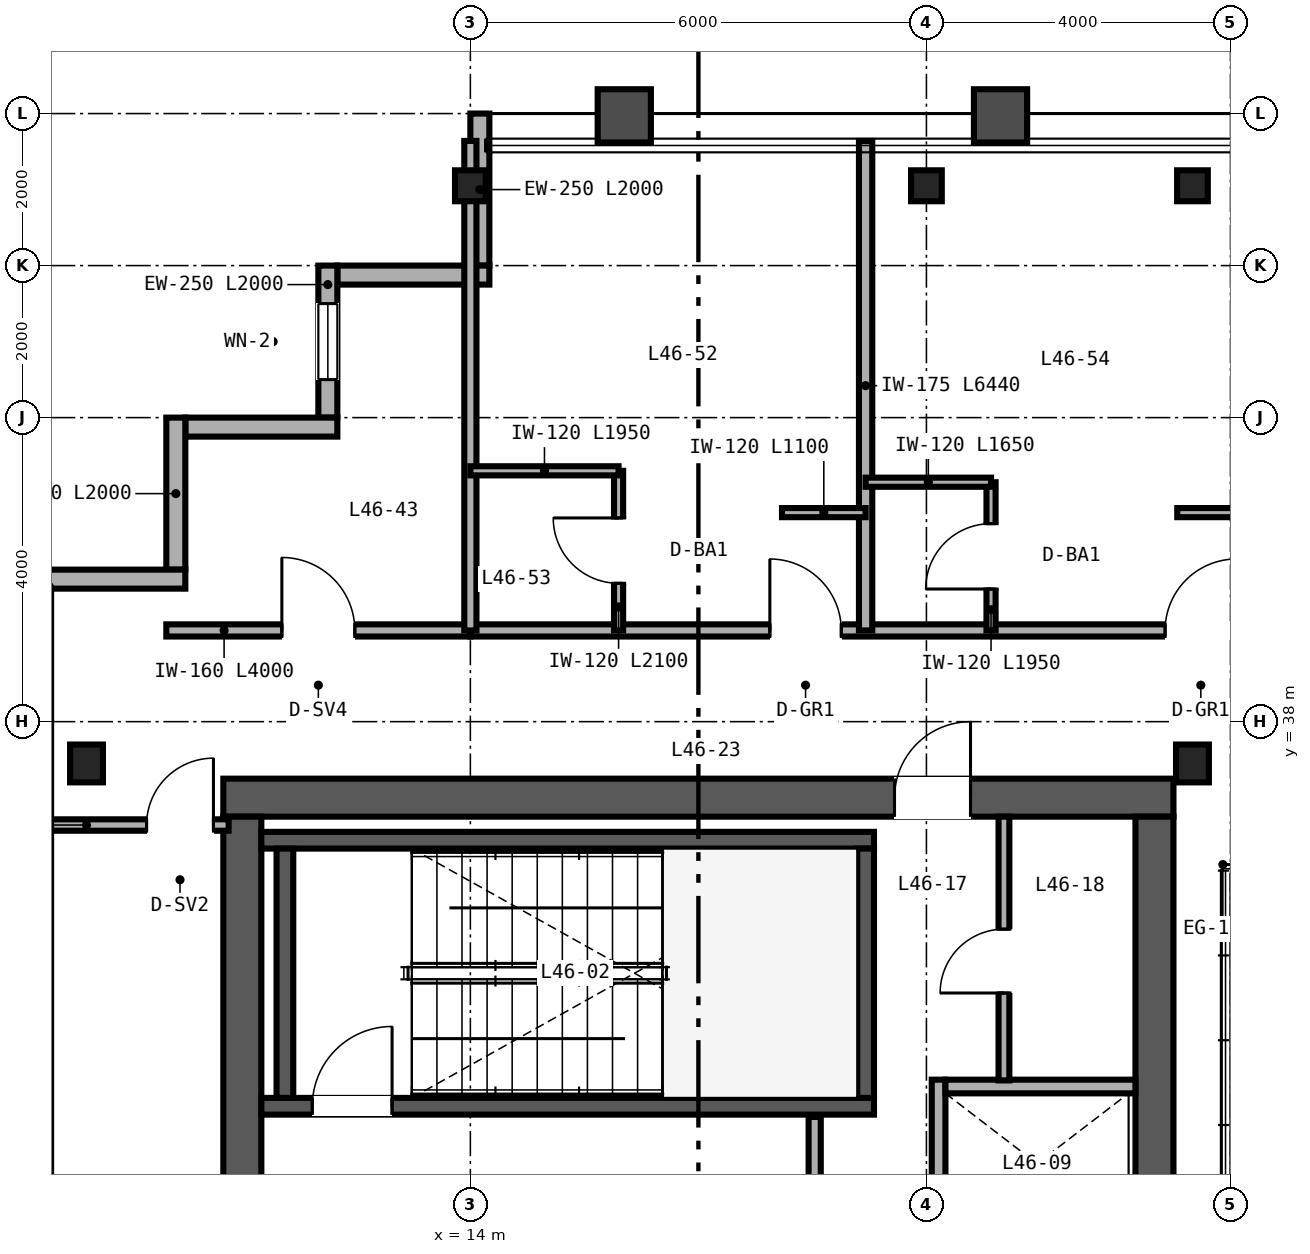
"""IFC4 building model, lengths in metres.
Left out: names, types, materials, properties, quantities, classifications, styles, units other than length and angle.
Written with IfcOpenShell. Run it as: python <this file> out.ifc"""

import sys

from ifc_helpers import new_model, si_unit, direction, frame, frame_2d, origin, origin_2d, place, context, subcontext, project, spatial, rectangle, i_section, extrude, source, transform, mapped, element, fill, save


model = new_model("IFC4")
c1 = context("Model", 3, precision=1e-05, world=origin(), true_north=direction((0.0, 1.0)))
c2 = subcontext(c1, "Body", "Model", "MODEL_VIEW")
j1 = project(units=[si_unit("LENGTHUNIT", "METRE"), si_unit("PLANEANGLEUNIT", "RADIAN")], contexts=[c1])
p1 = place(None, origin())
s1 = spatial("IfcSite", under=j1, at=p1, CompositionType="ELEMENT")
p2 = place(p1, origin())
s2 = spatial("IfcBuilding", under=s1, at=p2, CompositionType="ELEMENT")
p3 = place(p2, frame((0.0, 0.0, 184.8)))
s3 = spatial("IfcBuildingStorey", under=s2, at=p3, CompositionType="ELEMENT", Elevation=184.8)
p4 = place(p3, frame((10.75, 37.0, 0.0), z_axis=(0.0, 0.0, 1.0), x_axis=(1.0, 0.0, 0.0)))
e1 = element("IfcWall", 1, at=p4, inside=s3, PredefinedType="SHEAR", context=c2, shape_type="SweptSolid", body=[
    extrude(rectangle(XDim=12.5, YDim=0.5, at=frame_2d((6.25, 0.0))), origin(), (0.0, 0.0, 1.0), 3.37),
])
p5 = place(p4, frame((8.83, 0.0, 0.0)))
e2 = element("IfcOpeningElement", 2, at=p5, cuts=e1, PredefinedType="OPENING", context=c2, shape_type="SweptSolid", body=[
    extrude(rectangle(XDim=1.0, YDim=2.15, at=frame_2d((0.5, 1.075))), frame((0.0, 0.26, 0.0), z_axis=(0.0, -1.0, 0.0), x_axis=(1.0, 0.0, 0.0)), (0.0, 0.0, 1.0), 0.52),
])
for number, where, z_axis, x_axis in (
    (3, (11.0, 15.25, 0.0), (0.0, 0.0, 1.0), (0.0, 1.0, 0.0)),
    (4, (23.0, 15.25, 0.0), (0.0, 0.0, 1.0), (0.0, 1.0, 0.0)),
):
    element("IfcWall", number, at=place(p3, frame(where, z_axis=z_axis, x_axis=x_axis)), inside=s3, PredefinedType="SHEAR", context=c2, shape_type="SweptSolid", body=[
        extrude(rectangle(XDim=21.5, YDim=0.5, at=frame_2d((10.75, 0.0))), origin(), (0.0, 0.0, 1.0), 3.37),
    ])
p6 = place(p3, frame((11.25, 32.94, 0.0), z_axis=(0.0, 0.0, 1.0), x_axis=(1.0, 0.0, 0.0)))
e5 = element("IfcWall", 5, at=p6, inside=s3, PredefinedType="SHEAR", context=c2, shape_type="SweptSolid", body=[
    extrude(rectangle(XDim=8.06, YDim=0.22, at=frame_2d((4.03, 0.0))), origin(), (0.0, 0.0, 1.0), 3.4),
])
p7 = place(p6, frame((0.67, 0.0, 0.0)))
e6 = element("IfcOpeningElement", 6, at=p7, cuts=e5, PredefinedType="OPENING", context=c2, shape_type="SweptSolid", body=[
    extrude(rectangle(XDim=1.05, YDim=2.15, at=frame_2d((0.525, 1.075))), frame((0.0, 0.12, 0.0), z_axis=(0.0, -1.0, 0.0), x_axis=(1.0, 0.0, 0.0)), (0.0, 0.0, 1.0), 0.24),
])
p8 = place(p3, frame((11.25, 36.44, 0.0), z_axis=(0.0, 0.0, 1.0), x_axis=(1.0, 0.0, 0.0)))
e7 = element("IfcWall", 7, at=p8, inside=s3, PredefinedType="SHEAR", context=c2, shape_type="SweptSolid", body=[
    extrude(rectangle(XDim=8.06, YDim=0.22, at=frame_2d((4.03, 0.0))), origin(), (0.0, 0.0, 1.0), 3.4),
])
for number, where, z_axis, x_axis in (
    (8, (11.56, 33.05, 0.0), (0.0, 0.0, 1.0), (0.0, 1.0, 0.0)),
    (9, (19.2, 33.05, 0.0), (0.0, 0.0, 1.0), (0.0, 1.0, 0.0)),
):
    element("IfcWall", number, at=place(p3, frame(where, z_axis=z_axis, x_axis=x_axis)), inside=s3, PredefinedType="SHEAR", context=c2, shape_type="SweptSolid", body=[
        extrude(rectangle(XDim=3.28, YDim=0.22, at=frame_2d((1.64, 0.0))), origin(), (0.0, 0.0, 1.0), 3.4),
    ])
m1 = source(origin(), c2, "Body", "SweptSolid", [
    extrude(i_section(OverallWidth=0.432, OverallDepth=0.498, WebThickness=0.056, FlangeThickness=0.089, FilletRadius=0.025, at=origin_2d()), origin(), (0.0, 0.0, 1.0), 3.37),
])
for number, where, z_axis, x_axis in (
    (10, (8.95, 37.45, 0.0), (0.0, 0.0, 1.0), (1.0, 0.0, 0.0)),
    (11, (23.5, 37.45, 0.0), (0.0, 0.0, 1.0), (1.0, 0.0, 0.0)),
):
    element("IfcColumn", number, at=place(p3, frame(where, z_axis=z_axis, x_axis=x_axis)), inside=s3, PredefinedType="COLUMN", context=c2, shape_type="MappedRepresentation", body=[
        mapped(m1, transform((0.0, 0.0, 0.0), scale=1.0)),
    ])
m2 = source(origin(), c2, "Body", "SweptSolid", [
    extrude(i_section(OverallWidth=0.404, OverallDepth=0.407, WebThickness=0.027, FlangeThickness=0.044, FilletRadius=0.025, at=origin_2d()), origin(), (0.0, 0.0, 1.0), 3.37),
])
for number, where, z_axis, x_axis in (
    (12, (14.0, 45.05, 0.0), (0.0, 0.0, 1.0), (1.0, 0.0, 0.0)),
    (13, (20.0, 45.05, 0.0), (0.0, 0.0, 1.0), (1.0, 0.0, 0.0)),
    (14, (23.5, 45.05, 0.0), (0.0, 0.0, 1.0), (1.0, 0.0, 0.0)),
):
    element("IfcColumn", number, at=place(p3, frame(where, z_axis=z_axis, x_axis=x_axis)), inside=s3, PredefinedType="COLUMN", context=c2, shape_type="MappedRepresentation", body=[
        mapped(m2, transform((0.0, 0.0, 0.0), scale=1.0)),
    ])
p9 = place(p3, frame((14.125, 46.0, 0.0), z_axis=(0.0, 0.0, 1.0), x_axis=(0.0, -1.0, 0.0)))
e15 = element("IfcWall", 15, at=p9, inside=s3, PredefinedType="SOLIDWALL", context=c2, shape_type="SweptSolid", body=[
    extrude(rectangle(XDim=2.0, YDim=0.25, at=frame_2d((1.0, 0.0))), origin(), (0.0, 0.0, 1.0), 2.677),
])
p10 = place(p3, frame((14.25, 43.875, 0.0), z_axis=(0.0, 0.0, 1.0), x_axis=(-1.0, 0.0, 0.0)))
e16 = element("IfcWall", 16, at=p10, inside=s3, PredefinedType="SOLIDWALL", context=c2, shape_type="SweptSolid", body=[
    extrude(rectangle(XDim=2.0, YDim=0.25, at=frame_2d((1.0, 0.0))), origin(), (0.0, 0.0, 1.0), 3.37),
])
p11 = place(p3, frame((12.125, 44.0, 0.0), z_axis=(0.0, 0.0, 1.0), x_axis=(0.0, -1.0, 0.0)))
e17 = element("IfcWall", 17, at=p11, inside=s3, PredefinedType="SOLIDWALL", context=c2, shape_type="SweptSolid", body=[
    extrude(rectangle(XDim=2.0, YDim=0.25, at=frame_2d((1.0, 0.0))), origin(), (0.0, 0.0, 1.0), 3.37),
])
p12 = place(p11, frame((0.5, 0.0, 0.85)))
e18 = element("IfcOpeningElement", 18, at=p12, cuts=e17, PredefinedType="OPENING", context=c2, shape_type="SweptSolid", body=[
    extrude(rectangle(XDim=1.0, YDim=1.9, at=frame_2d((0.5, 0.95))), frame((0.0, 0.135, 0.0), z_axis=(0.0, -1.0, 0.0), x_axis=(1.0, 0.0, 0.0)), (0.0, 0.0, 1.0), 0.27),
])
for number, where, z_axis, x_axis in (
    (19, (12.25, 41.875, 0.0), (0.0, 0.0, 1.0), (-1.0, 0.0, 0.0)),
    (20, (10.125, 42.0, 0.0), (0.0, 0.0, 1.0), (0.0, -1.0, 0.0)),
):
    element("IfcWall", number, at=place(p3, frame(where, z_axis=z_axis, x_axis=x_axis)), inside=s3, PredefinedType="SOLIDWALL", context=c2, shape_type="SweptSolid", body=[
        extrude(rectangle(XDim=2.0, YDim=0.25, at=frame_2d((1.0, 0.0))), origin(), (0.0, 0.0, 1.0), 3.37),
    ])
p13 = place(p3, frame((10.25, 39.875, 0.0), z_axis=(0.0, 0.0, 1.0), x_axis=(-1.0, 0.0, 0.0)))
e21 = element("IfcWall", 21, at=p13, inside=s3, PredefinedType="SOLIDWALL", context=c2, shape_type="SweptSolid", body=[
    extrude(rectangle(XDim=2.25, YDim=0.25, at=frame_2d((1.125, 0.0))), origin(), (0.0, 0.0, 1.0), 3.37),
])
p14 = place(p3, frame((20.16, 29.0, 0.0), z_axis=(0.0, 0.0, 1.0), x_axis=(0.0, 1.0, 0.0)))
e22 = element("IfcWall", 22, at=p14, inside=s3, PredefinedType="SOLIDWALL", context=c2, shape_type="SweptSolid", body=[
    extrude(rectangle(XDim=4.29, YDim=0.18, at=frame_2d((2.145, 0.0))), origin(), (0.0, 0.0, 1.0), 3.37),
])
p15 = place(p3, frame((20.25, 33.2, 0.0), z_axis=(0.0, 0.0, 1.0), x_axis=(1.0, 0.0, 0.0)))
e23 = element("IfcWall", 23, at=p15, inside=s3, PredefinedType="SOLIDWALL", context=c2, shape_type="SweptSolid", body=[
    extrude(rectangle(XDim=2.5, YDim=0.18, at=frame_2d((1.25, 0.0))), origin(), (0.0, 0.0, 1.0), 3.37),
])
p16 = place(p3, frame((18.53, 28.9, 0.0), z_axis=(0.0, 0.0, 1.0), x_axis=(0.0, 1.0, 0.0)))
e24 = element("IfcWall", 24, at=p16, inside=s3, PredefinedType="PARTITIONING", context=c2, shape_type="SweptSolid", body=[
    extrude(rectangle(XDim=3.9, YDim=0.16, at=frame_2d((1.95, 0.0))), origin(), (0.0, 0.0, 1.0), 3.37),
])
p17 = place(p16, frame((1.5, 0.0, 0.0)))
e25 = element("IfcOpeningElement", 25, at=p17, cuts=e24, PredefinedType="OPENING", context=c2, shape_type="SweptSolid", body=[
    extrude(rectangle(XDim=1.0, YDim=2.15, at=frame_2d((0.5, 1.075))), frame((0.0, 0.09, 0.0), z_axis=(0.0, -1.0, 0.0), x_axis=(1.0, 0.0, 0.0)), (0.0, 0.0, 1.0), 0.18),
])
p18 = place(p3, frame((21.02, 33.28, 0.0), z_axis=(0.0, 0.0, 1.0), x_axis=(0.0, 1.0, 0.0)))
e26 = element("IfcWall", 26, at=p18, inside=s3, PredefinedType="PARTITIONING", context=c2, shape_type="SweptSolid", body=[
    extrude(rectangle(XDim=3.47, YDim=0.142, at=frame_2d((1.735, 0.0))), origin(), (0.0, 0.0, 1.0), 3.37),
])
p19 = place(p18, frame((1.15, 0.0, 0.0)))
e27 = element("IfcOpeningElement", 27, at=p19, cuts=e26, PredefinedType="OPENING", context=c2, shape_type="SweptSolid", body=[
    extrude(rectangle(XDim=0.84, YDim=2.1, at=frame_2d((0.42, 1.05))), frame((0.0, 0.081, 0.0), z_axis=(0.0, -1.0, 0.0), x_axis=(1.0, 0.0, 0.0)), (0.0, 0.0, 1.0), 0.162),
])
p20 = place(p3, frame((8.16, 36.64, 0.0), z_axis=(0.0, 0.0, 1.0), x_axis=(1.0, 0.0, 0.0)))
e28 = element("IfcWall", 28, at=p20, inside=s3, PredefinedType="PARTITIONING", context=c2, shape_type="SweptSolid", body=[
    extrude(rectangle(XDim=2.66, YDim=0.15, at=frame_2d((1.33, 0.0))), origin(), (0.0, 0.0, 1.0), 2.753),
])
p21 = place(p20, frame((1.58, 0.0, 0.0)))
e29 = element("IfcOpeningElement", 29, at=p21, cuts=e28, PredefinedType="OPENING", context=c2, shape_type="SweptSolid", body=[
    extrude(rectangle(XDim=0.88, YDim=2.15, at=frame_2d((0.44, 1.075))), frame((0.0, 0.085, 0.0), z_axis=(0.0, -1.0, 0.0), x_axis=(1.0, 0.0, 0.0)), (0.0, 0.0, 1.0), 0.17),
])
p22 = place(p3, frame((10.0, 39.2, 0.0), z_axis=(0.0, 0.0, 1.0), x_axis=(1.0, 0.0, 0.0)))
e30 = element("IfcWall", 30, at=p22, inside=s3, PredefinedType="PARTITIONING", context=c2, shape_type="SweptSolid", body=[
    extrude(rectangle(XDim=4.0, YDim=0.16, at=frame_2d((2.0, 0.0))), origin(), (0.0, 0.0, 1.0), 3.37),
])
p23 = place(p22, frame((1.52, 0.0, 0.0)))
e31 = element("IfcOpeningElement", 31, at=p23, cuts=e30, PredefinedType="OPENING", context=c2, shape_type="SweptSolid", body=[
    extrude(rectangle(XDim=0.96, YDim=2.15, at=frame_2d((0.48, 1.075))), frame((0.0, 0.09, 0.0), z_axis=(0.0, -1.0, 0.0), x_axis=(1.0, 0.0, 0.0)), (0.0, 0.0, 1.0), 0.18),
])
p24 = place(p3, frame((14.0, 39.2, 0.0), z_axis=(0.0, 0.0, 1.0), x_axis=(1.0, 0.0, 0.0)))
e32 = element("IfcWall", 32, at=p24, inside=s3, PredefinedType="PARTITIONING", context=c2, shape_type="SweptSolid", body=[
    extrude(rectangle(XDim=36.0, YDim=0.16, at=frame_2d((18.0, 0.0))), origin(), (0.0, 0.0, 1.0), 2.913),
])
p25 = place(p24, frame((3.94, 0.0, 0.0)))
e33 = element("IfcOpeningElement", 33, at=p25, cuts=e32, PredefinedType="OPENING", context=c2, shape_type="SweptSolid", body=[
    extrude(rectangle(XDim=0.94, YDim=2.15, at=frame_2d((0.47, 1.075))), frame((0.0, 0.09, 0.0), z_axis=(0.0, -1.0, 0.0), x_axis=(1.0, 0.0, 0.0)), (0.0, 0.0, 1.0), 0.18),
])
p26 = place(p24, frame((9.14, 0.0, 0.0)))
e34 = element("IfcOpeningElement", 34, at=p26, cuts=e32, PredefinedType="OPENING", context=c2, shape_type="SweptSolid", body=[
    extrude(rectangle(XDim=0.94, YDim=2.15, at=frame_2d((0.47, 1.075))), frame((0.0, 0.09, 0.0), z_axis=(0.0, -1.0, 0.0), x_axis=(1.0, 0.0, 0.0)), (0.0, 0.0, 1.0), 0.18),
])
p27 = place(p24, frame((12.72, 0.0, 0.0)))
e35 = element("IfcOpeningElement", 35, at=p27, cuts=e32, PredefinedType="OPENING", context=c2, shape_type="SweptSolid", body=[
    extrude(rectangle(XDim=0.96, YDim=2.15, at=frame_2d((0.48, 1.075))), frame((0.0, 0.09, 0.0), z_axis=(0.0, -1.0, 0.0), x_axis=(1.0, 0.0, 0.0)), (0.0, 0.0, 1.0), 0.18),
])
p28 = place(p24, frame((18.42, 0.0, 0.0)))
e36 = element("IfcOpeningElement", 36, at=p28, cuts=e32, PredefinedType="OPENING", context=c2, shape_type="SweptSolid", body=[
    extrude(rectangle(XDim=0.96, YDim=2.15, at=frame_2d((0.48, 1.075))), frame((0.0, 0.09, 0.0), z_axis=(0.0, -1.0, 0.0), x_axis=(1.0, 0.0, 0.0)), (0.0, 0.0, 1.0), 0.18),
])
p29 = place(p24, frame((26.34, 0.0, 0.0)))
e37 = element("IfcOpeningElement", 37, at=p29, cuts=e32, PredefinedType="OPENING", context=c2, shape_type="SweptSolid", body=[
    extrude(rectangle(XDim=0.94, YDim=2.15, at=frame_2d((0.47, 1.075))), frame((0.0, 0.09, 0.0), z_axis=(0.0, -1.0, 0.0), x_axis=(1.0, 0.0, 0.0)), (0.0, 0.0, 1.0), 0.18),
])
p30 = place(p24, frame((30.54, 0.0, 0.0)))
e38 = element("IfcOpeningElement", 38, at=p30, cuts=e32, PredefinedType="OPENING", context=c2, shape_type="SweptSolid", body=[
    extrude(rectangle(XDim=0.94, YDim=2.15, at=frame_2d((0.47, 1.075))), frame((0.0, 0.09, 0.0), z_axis=(0.0, -1.0, 0.0), x_axis=(1.0, 0.0, 0.0)), (0.0, 0.0, 1.0), 0.18),
])
p31 = place(p24, frame((34.74, 0.0, 0.0)))
e39 = element("IfcOpeningElement", 39, at=p31, cuts=e32, PredefinedType="OPENING", context=c2, shape_type="SweptSolid", body=[
    extrude(rectangle(XDim=0.94, YDim=2.15, at=frame_2d((0.47, 1.075))), frame((0.0, 0.09, 0.0), z_axis=(0.0, -1.0, 0.0), x_axis=(1.0, 0.0, 0.0)), (0.0, 0.0, 1.0), 0.18),
])
p32 = place(p3, frame((14.0, 39.2, 0.0), z_axis=(0.0, 0.0, 1.0), x_axis=(0.0, 1.0, 0.0)))
e40 = element("IfcWall", 40, at=p32, inside=s3, PredefinedType="PARTITIONING", context=c2, shape_type="SweptSolid", body=[
    extrude(rectangle(XDim=6.44, YDim=0.16, at=frame_2d((3.22, 0.0))), origin(), (0.0, 0.0, 1.0), 2.677),
])
p33 = place(p3, frame((19.2, 39.2, 0.0), z_axis=(0.0, 0.0, 1.0), x_axis=(0.0, 1.0, 0.0)))
e41 = element("IfcWall", 41, at=p33, inside=s3, PredefinedType="PARTITIONING", context=c2, shape_type="SweptSolid", body=[
    extrude(rectangle(XDim=6.44, YDim=0.175, at=frame_2d((3.22, 0.0))), origin(), (0.0, 0.0, 1.0), 2.677),
])
p34 = place(p3, frame((15.95, 39.2, 0.0), z_axis=(0.0, 0.0, 1.0), x_axis=(0.0, 1.0, 0.0)))
e42 = element("IfcWall", 42, at=p34, inside=s3, PredefinedType="PARTITIONING", context=c2, shape_type="SweptSolid", body=[
    extrude(rectangle(XDim=2.1, YDim=0.12, at=frame_2d((1.05, 0.0))), origin(), (0.0, 0.0, 1.0), 3.37),
])
p35 = place(p34, frame((0.62, 0.0, 0.0)))
e43 = element("IfcOpeningElement", 43, at=p35, cuts=e42, PredefinedType="OPENING", context=c2, shape_type="SweptSolid", body=[
    extrude(rectangle(XDim=0.86, YDim=2.1, at=frame_2d((0.43, 1.05))), frame((0.0, 0.07, 0.0), z_axis=(0.0, -1.0, 0.0), x_axis=(1.0, 0.0, 0.0)), (0.0, 0.0, 1.0), 0.14),
])
p36 = place(p3, frame((14.0, 41.3, 0.0), z_axis=(0.0, 0.0, 1.0), x_axis=(1.0, 0.0, 0.0)))
e44 = element("IfcWall", 44, at=p36, inside=s3, PredefinedType="PARTITIONING", context=c2, shape_type="SweptSolid", body=[
    extrude(rectangle(XDim=1.95, YDim=0.12, at=frame_2d((0.975, 0.0))), origin(), (0.0, 0.0, 1.0), 3.37),
])
p37 = place(p3, frame((18.1, 40.75, 0.0), z_axis=(0.0, 0.0, 1.0), x_axis=(1.0, 0.0, 0.0)))
e45 = element("IfcWall", 45, at=p37, inside=s3, PredefinedType="PARTITIONING", context=c2, shape_type="SweptSolid", body=[
    extrude(rectangle(XDim=1.1, YDim=0.12, at=frame_2d((0.55, 0.0))), origin(), (0.0, 0.0, 1.0), 3.37),
])
p38 = place(p3, frame((20.85, 39.2, 0.0), z_axis=(0.0, 0.0, 1.0), x_axis=(0.0, 1.0, 0.0)))
e46 = element("IfcWall", 46, at=p38, inside=s3, PredefinedType="PARTITIONING", context=c2, shape_type="SweptSolid", body=[
    extrude(rectangle(XDim=1.95, YDim=0.12, at=frame_2d((0.975, 0.0))), origin(), (0.0, 0.0, 1.0), 3.37),
])
p39 = place(p38, frame((0.545, 0.0, 0.0)))
e47 = element("IfcOpeningElement", 47, at=p39, cuts=e46, PredefinedType="OPENING", context=c2, shape_type="SweptSolid", body=[
    extrude(rectangle(XDim=0.86, YDim=2.1, at=frame_2d((0.43, 1.05))), frame((0.0, 0.07, 0.0), z_axis=(0.0, -1.0, 0.0), x_axis=(1.0, 0.0, 0.0)), (0.0, 0.0, 1.0), 0.14),
])
p40 = place(p3, frame((19.2, 41.15, 0.0), z_axis=(0.0, 0.0, 1.0), x_axis=(1.0, 0.0, 0.0)))
e48 = element("IfcWall", 48, at=p40, inside=s3, PredefinedType="PARTITIONING", context=c2, shape_type="SweptSolid", body=[
    extrude(rectangle(XDim=1.65, YDim=0.12, at=frame_2d((0.825, 0.0))), origin(), (0.0, 0.0, 1.0), 3.37),
])
p41 = place(p3, frame((23.3, 40.75, 0.0), z_axis=(0.0, 0.0, 1.0), x_axis=(1.0, 0.0, 0.0)))
e49 = element("IfcWall", 49, at=p41, inside=s3, PredefinedType="PARTITIONING", context=c2, shape_type="SweptSolid", body=[
    extrude(rectangle(XDim=1.1, YDim=0.12, at=frame_2d((0.55, 0.0))), origin(), (0.0, 0.0, 1.0), 2.913),
])
m3 = source(origin(), c2, "Body", "SweptSolid", [
    extrude(rectangle(XDim=1.0, YDim=1.9, at=frame_2d((0.5, 0.95))), frame((0.0, 0.03, 0.0), z_axis=(0.0, -1.0, 0.0), x_axis=(1.0, 0.0, 0.0)), (0.0, 0.0, 1.0), 0.06),
])
p42 = place(p12, origin())
e50 = element("IfcWindow", 50, at=p42, inside=s3, PartitioningType="SINGLE_PANEL", PredefinedType="WINDOW", context=c2, shape_type="MappedRepresentation", body=[
    mapped(m3, transform((0.0, 0.0, 0.0), scale=1.0)),
])
fill(e18, e50)
m4 = source(origin(), c2, "Body", "SweptSolid", [
    extrude(rectangle(XDim=1.05, YDim=2.15, at=frame_2d((0.525, 1.075))), frame((0.0, 0.025, 0.0), z_axis=(0.0, -1.0, 0.0), x_axis=(1.0, 0.0, 0.0)), (0.0, 0.0, 1.0), 0.05),
])
p43 = place(p7, origin())
e51 = element("IfcDoor", 51, at=p43, inside=s3, OperationType="SINGLE_SWING_RIGHT", PredefinedType="DOOR", context=c2, shape_type="MappedRepresentation", body=[
    mapped(m4, transform((0.0, 0.0, 0.0), scale=1.0)),
])
fill(e6, e51)
m5 = source(origin(), c2, "Body", "SweptSolid", [
    extrude(rectangle(XDim=0.84, YDim=2.1, at=frame_2d((0.42, 1.05))), frame((0.0, 0.025, 0.0), z_axis=(0.0, -1.0, 0.0), x_axis=(1.0, 0.0, 0.0)), (0.0, 0.0, 1.0), 0.05),
])
p44 = place(p19, origin())
e52 = element("IfcDoor", 52, at=p44, inside=s3, OperationType="SINGLE_SWING_LEFT", PredefinedType="DOOR", context=c2, shape_type="MappedRepresentation", body=[
    mapped(m5, transform((0.0, 0.0, 0.0), scale=1.0)),
])
fill(e27, e52)
m6 = source(origin(), c2, "Body", "SweptSolid", [
    extrude(rectangle(XDim=1.0, YDim=2.15, at=frame_2d((0.5, 1.075))), frame((0.0, 0.025, 0.0), z_axis=(0.0, -1.0, 0.0), x_axis=(1.0, 0.0, 0.0)), (0.0, 0.0, 1.0), 0.05),
])
p45 = place(p5, origin())
e53 = element("IfcDoor", 53, at=p45, inside=s3, OperationType="SINGLE_SWING_RIGHT", PredefinedType="DOOR", context=c2, shape_type="MappedRepresentation", body=[
    mapped(m6, transform((0.0, 0.0, 0.0), scale=1.0)),
])
fill(e2, e53)
m7 = source(origin(), c2, "Body", "SweptSolid", [
    extrude(rectangle(XDim=0.88, YDim=2.15, at=frame_2d((0.44, 1.075))), frame((0.0, 0.025, 0.0), z_axis=(0.0, -1.0, 0.0), x_axis=(1.0, 0.0, 0.0)), (0.0, 0.0, 1.0), 0.05),
])
p46 = place(p21, origin())
e54 = element("IfcDoor", 54, at=p46, inside=s3, OperationType="SINGLE_SWING_RIGHT", PredefinedType="DOOR", context=c2, shape_type="MappedRepresentation", body=[
    mapped(m7, transform((0.0, 0.0, 0.0), scale=1.0)),
])
fill(e29, e54)
m8 = source(origin(), c2, "Body", "SweptSolid", [
    extrude(rectangle(XDim=0.96, YDim=2.15, at=frame_2d((0.48, 1.075))), frame((0.0, 0.025, 0.0), z_axis=(0.0, -1.0, 0.0), x_axis=(1.0, 0.0, 0.0)), (0.0, 0.0, 1.0), 0.05),
])
p47 = place(p23, origin())
e55 = element("IfcDoor", 55, at=p47, inside=s3, OperationType="SINGLE_SWING_LEFT", PredefinedType="DOOR", context=c2, shape_type="MappedRepresentation", body=[
    mapped(m8, transform((0.0, 0.0, 0.0), scale=1.0)),
])
fill(e31, e55)
m9 = source(origin(), c2, "Body", "SweptSolid", [
    extrude(rectangle(XDim=0.86, YDim=2.1, at=frame_2d((0.43, 1.05))), frame((0.0, 0.025, 0.0), z_axis=(0.0, -1.0, 0.0), x_axis=(1.0, 0.0, 0.0)), (0.0, 0.0, 1.0), 0.05),
])
p48 = place(p35, origin())
e56 = element("IfcDoor", 56, at=p48, inside=s3, OperationType="SINGLE_SWING_RIGHT", PredefinedType="DOOR", context=c2, shape_type="MappedRepresentation", body=[
    mapped(m9, transform((0.0, 0.0, 0.0), scale=1.0)),
])
fill(e43, e56)
p49 = place(p39, origin())
e57 = element("IfcDoor", 57, at=p49, inside=s3, OperationType="SINGLE_SWING_LEFT", PredefinedType="DOOR", context=c2, shape_type="MappedRepresentation", body=[
    mapped(m9, transform((0.0, 0.0, 0.0), scale=1.0)),
])
fill(e47, e57)
m10 = source(origin(), c2, "Body", "SweptSolid", [
    extrude(rectangle(XDim=0.94, YDim=2.15, at=frame_2d((0.47, 1.075))), frame((0.0, 0.025, 0.0), z_axis=(0.0, -1.0, 0.0), x_axis=(1.0, 0.0, 0.0)), (0.0, 0.0, 1.0), 0.05),
])
p50 = place(p25, origin())
e58 = element("IfcDoor", 58, at=p50, inside=s3, OperationType="SINGLE_SWING_LEFT", PredefinedType="DOOR", context=c2, shape_type="MappedRepresentation", body=[
    mapped(m10, transform((0.0, 0.0, 0.0), scale=1.0)),
])
fill(e33, e58)
p51 = place(p26, origin())
e59 = element("IfcDoor", 59, at=p51, inside=s3, OperationType="SINGLE_SWING_RIGHT", PredefinedType="DOOR", context=c2, shape_type="MappedRepresentation", body=[
    mapped(m10, transform((0.0, 0.0, 0.0), scale=1.0)),
])
fill(e34, e59)
save(model, sys.argv[1])
